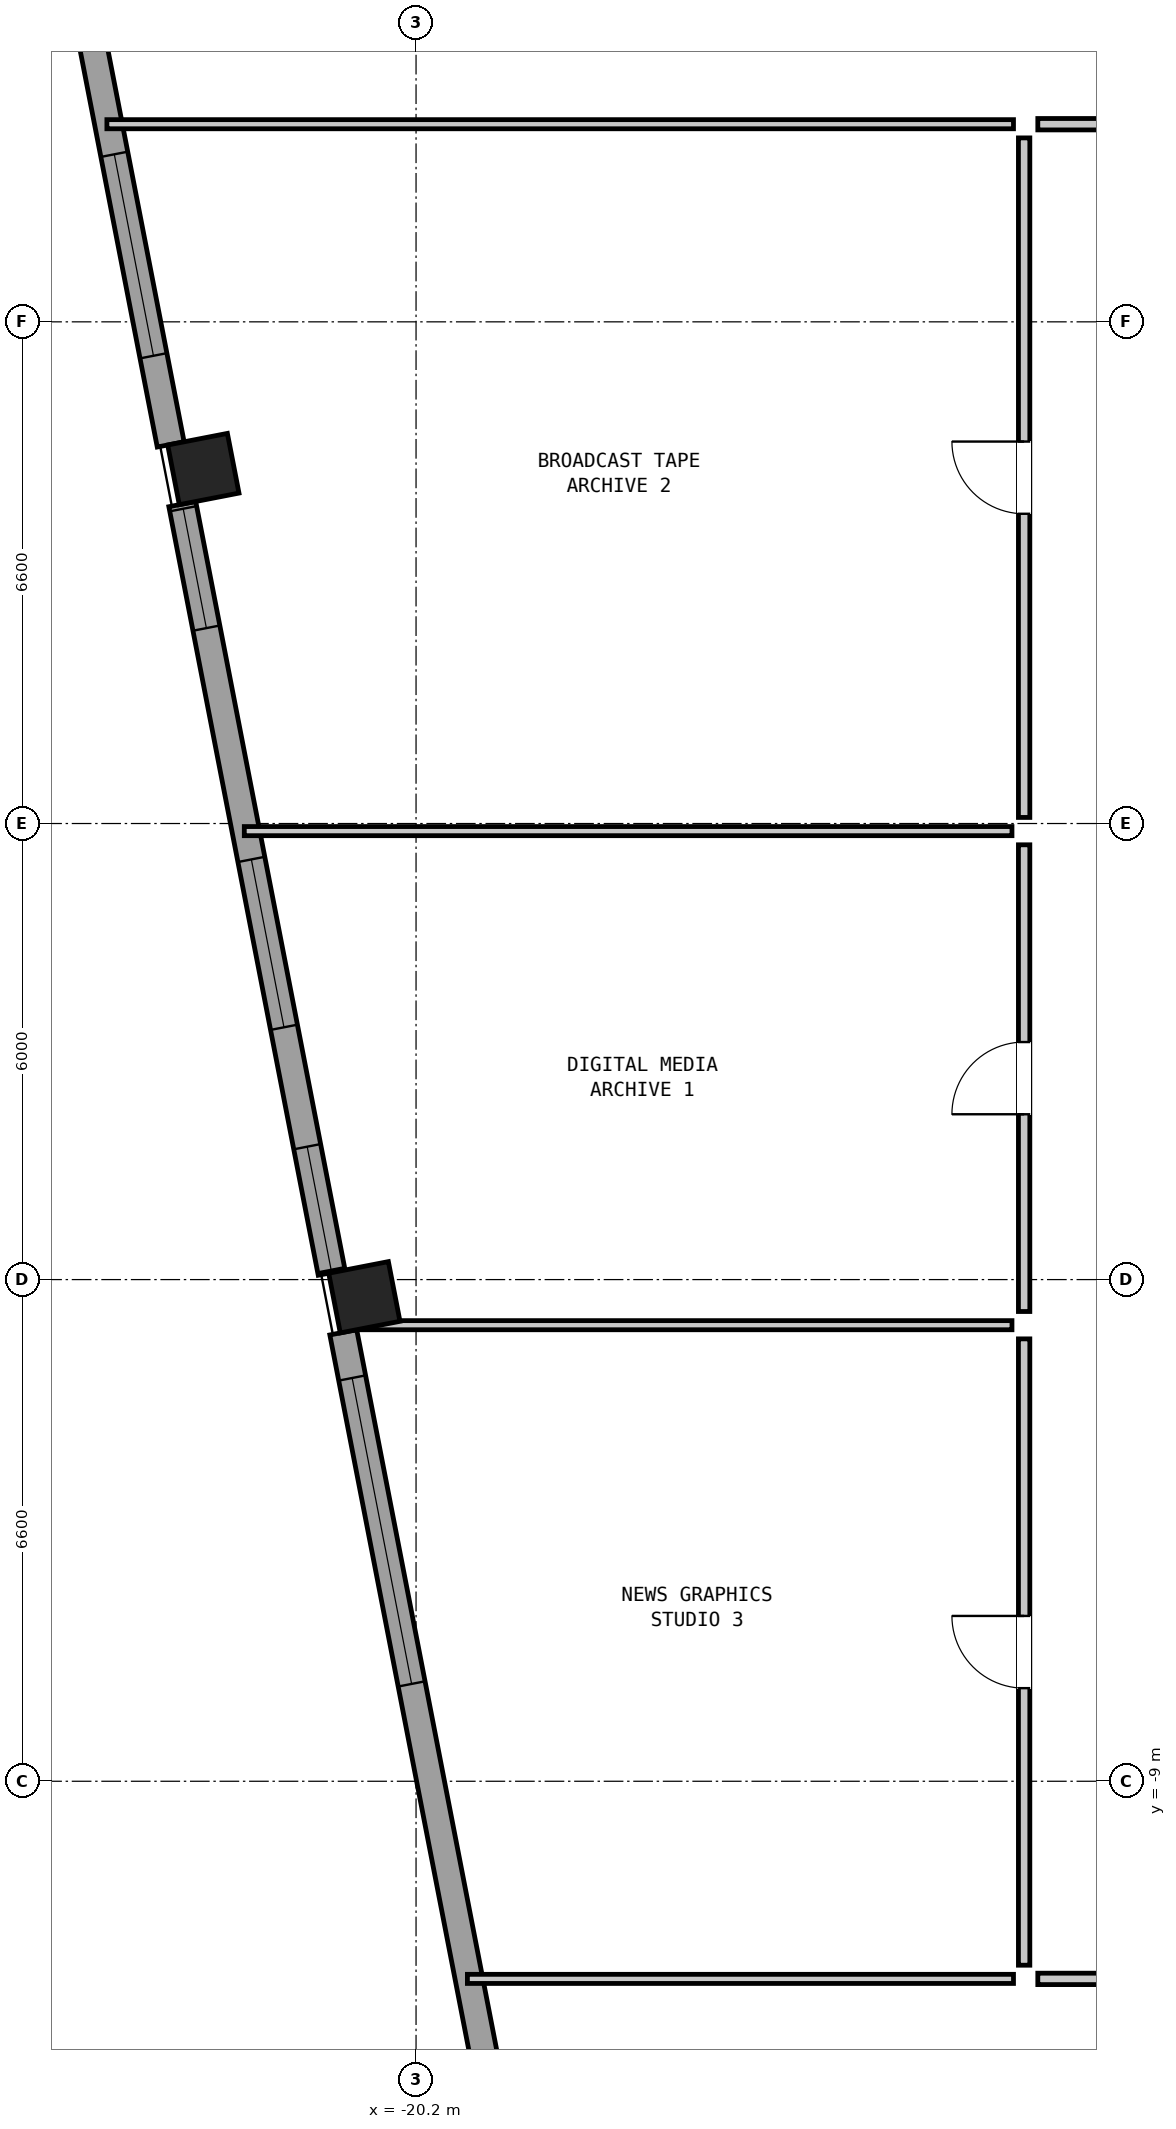
"""IFC4 building model, lengths in metres.
Left out: names, types, materials, properties, quantities, classifications, styles, units other than length and angle.
Written with IfcOpenShell. Run it as: python <this file> out.ifc"""

import sys

from ifc_helpers import new_model, si_unit, direction, frame, frame_2d, origin, origin_2d, place, context, subcontext, project, spatial, rectangle, hollow_rectangle, extrude, element, fill, save


model = new_model("IFC4")
c1 = context("Model", 3, precision=1e-05, world=origin(), true_north=direction((0.0, 1.0)))
c2 = subcontext(c1, "Body", "Model", "MODEL_VIEW")
j1 = project(units=[si_unit("LENGTHUNIT", "METRE"), si_unit("PLANEANGLEUNIT", "RADIAN")], contexts=[c1])
p1 = place(None, origin())
s1 = spatial("IfcSite", under=j1, at=p1, CompositionType="ELEMENT")
p2 = place(p1, origin())
s2 = spatial("IfcBuilding", under=s1, at=p2, CompositionType="ELEMENT")
p3 = place(p2, frame((0.0, 0.0, 131.1)))
s3 = spatial("IfcBuildingStorey", under=s2, at=p3, CompositionType="ELEMENT", Elevation=131.1)
for number, where, z_axis, x_axis in (
    (1, (-22.998, 8.263, 0.0), (0.0, 0.0, 1.0), (-0.191, 0.982, 0.0)),
    (2, (-20.88, -2.633, 0.0), (0.0, 0.0, 1.0), (-0.191, 0.982, 0.0)),
):
    element("IfcColumn", number, at=place(p3, frame(where, z_axis=z_axis, x_axis=x_axis)), inside=s3, PredefinedType="COLUMN", context=c2, shape_type="SweptSolid", body=[
        extrude(hollow_rectangle(XDim=0.8, YDim=0.8, WallThickness=0.05, at=origin_2d()), origin(), (0.0, 0.0, 1.0), 3.05),
    ])
p4 = place(p3, frame((-19.19, -13.217, 0.0), z_axis=(0.0, 0.0, 1.0), x_axis=(-0.190822765986, 0.981624506612, 0.0)))
e3 = element("IfcWall", 3, at=p4, inside=s3, PredefinedType="SOLIDWALL", context=c2, shape_type="SweptSolid", body=[
    extrude(rectangle(XDim=10.312, YDim=0.36, at=frame_2d((5.156, 0.0))), origin(), (0.0, 0.0, 1.0), 2.067),
])
p5 = place(p4, frame((5.6, 0.0, 0.2)))
e4 = element("IfcOpeningElement", 4, at=p5, cuts=e3, PredefinedType="OPENING", context=c2, shape_type="SweptSolid", body=[
    extrude(rectangle(XDim=4.1, YDim=1.05, at=frame_2d((2.05, 0.525))), frame((0.0, 0.192, 0.0), z_axis=(0.0, -1.0, 0.0), x_axis=(1.0, 0.0, 0.0)), (0.0, 0.0, 1.0), 0.384),
])
p6 = place(p3, frame((-21.31, -2.309, 0.0), z_axis=(0.0, 0.0, 1.0), x_axis=(-0.190811924826, 0.981626614016, 0.0)))
e5 = element("IfcWall", 5, at=p6, inside=s3, PredefinedType="SOLIDWALL", context=c2, shape_type="SweptSolid", body=[
    extrude(rectangle(XDim=10.3, YDim=0.36, at=frame_2d((5.15, 0.0))), origin(), (0.0, 0.0, 1.0), 2.067),
])
p7 = place(p6, frame((0.038, 0.0, 1.15)))
e6 = element("IfcOpeningElement", 6, at=p7, cuts=e5, PredefinedType="OPENING", context=c2, shape_type="SweptSolid", body=[
    extrude(rectangle(XDim=1.65, YDim=0.75, at=frame_2d((0.825, 0.375))), frame((0.0, 0.192, 0.0), z_axis=(0.0, -1.0, 0.0), x_axis=(1.0, 0.0, 0.0)), (0.0, 0.0, 1.0), 0.384),
])
p8 = place(p6, frame((3.288, 0.0, 0.2)))
e7 = element("IfcOpeningElement", 7, at=p8, cuts=e5, PredefinedType="OPENING", context=c2, shape_type="SweptSolid", body=[
    extrude(rectangle(XDim=2.25, YDim=1.15, at=frame_2d((1.125, 0.575))), frame((0.0, 0.192, 0.0), z_axis=(0.0, -1.0, 0.0), x_axis=(1.0, 0.0, 0.0)), (0.0, 0.0, 1.0), 0.384),
])
p9 = place(p6, frame((8.638, 0.0, 1.15)))
e8 = element("IfcOpeningElement", 8, at=p9, cuts=e5, PredefinedType="OPENING", context=c2, shape_type="SweptSolid", body=[
    extrude(rectangle(XDim=1.6, YDim=0.75, at=frame_2d((0.8, 0.375))), frame((0.0, 0.192, 0.0), z_axis=(0.0, -1.0, 0.0), x_axis=(1.0, 0.0, 0.0)), (0.0, 0.0, 1.0), 0.384),
])
p10 = place(p3, frame((-23.428, 8.587, 0.0), z_axis=(0.0, 0.0, 1.0), x_axis=(-0.190822765986, 0.981624506612, 0.0)))
e9 = element("IfcWall", 9, at=p10, inside=s3, PredefinedType="SOLIDWALL", context=c2, shape_type="SweptSolid", body=[
    extrude(rectangle(XDim=10.312, YDim=0.36, at=frame_2d((5.156, 0.0))), origin(), (0.0, 0.0, 1.0), 2.067),
])
p11 = place(p10, frame((1.188, 0.0, 0.2)))
e10 = element("IfcOpeningElement", 10, at=p11, cuts=e9, PredefinedType="OPENING", context=c2, shape_type="SweptSolid", body=[
    extrude(rectangle(XDim=2.7, YDim=1.35, at=frame_2d((1.35, 0.675))), frame((0.0, 0.192, 0.0), z_axis=(0.0, -1.0, 0.0), x_axis=(1.0, 0.0, 0.0)), (0.0, 0.0, 1.0), 0.384),
])
p12 = place(p10, frame((6.038, 0.0, 1.2)))
e11 = element("IfcOpeningElement", 11, at=p12, cuts=e9, PredefinedType="OPENING", context=c2, shape_type="SweptSolid", body=[
    extrude(rectangle(XDim=1.9, YDim=0.7, at=frame_2d((0.95, 0.35))), frame((0.0, 0.192, 0.0), z_axis=(0.0, -1.0, 0.0), x_axis=(1.0, 0.0, 0.0)), (0.0, 0.0, 1.0), 0.384),
])
p13 = place(p3, frame((-24.267, 12.8, 0.0), z_axis=(0.0, 0.0, 1.0), x_axis=(1.0, 0.0, 0.0)))
e12 = element("IfcWall", 12, at=p13, inside=s3, PredefinedType="PARTITIONING", context=c2, shape_type="SweptSolid", body=[
    extrude(rectangle(XDim=11.927, YDim=0.12, at=frame_2d((5.964, 0.0))), origin(), (0.0, 0.0, 1.0), 2.83),
])
p14 = place(p3, frame((-19.524, -11.6, 0.0), z_axis=(0.0, 0.0, 1.0), x_axis=(1.0, 0.0, 0.0)))
e13 = element("IfcWall", 13, at=p14, inside=s3, PredefinedType="PARTITIONING", context=c2, shape_type="SweptSolid", body=[
    extrude(rectangle(XDim=7.184, YDim=0.12, at=frame_2d((3.592, 0.0))), origin(), (0.0, 0.0, 1.0), 2.347),
])
p15 = place(p3, frame((-21.196, -3.0, 0.0), z_axis=(0.0, 0.0, 1.0), x_axis=(1.0, 0.0, 0.0)))
e14 = element("IfcWall", 14, at=p15, inside=s3, PredefinedType="PARTITIONING", context=c2, shape_type="SweptSolid", body=[
    extrude(rectangle(XDim=8.836, YDim=0.12, at=frame_2d((4.418, 0.0))), origin(), (0.0, 0.0, 1.0), 1.883),
])
p16 = place(p3, frame((-22.459, 3.5, 0.0), z_axis=(0.0, 0.0, 1.0), x_axis=(1.0, 0.0, 0.0)))
e15 = element("IfcWall", 15, at=p16, inside=s3, PredefinedType="PARTITIONING", context=c2, shape_type="SweptSolid", body=[
    extrude(rectangle(XDim=10.099, YDim=0.12, at=frame_2d((5.05, 0.0))), origin(), (0.0, 0.0, 1.0), 1.883),
])
p17 = place(p3, frame((-12.02, 12.8, 0.0), z_axis=(0.0, 0.0, 1.0), x_axis=(1.0, 0.0, 0.0)))
e16 = element("IfcWall", 16, at=p17, inside=s3, PredefinedType="PARTITIONING", context=c2, shape_type="SweptSolid", body=[
    extrude(rectangle(XDim=5.34, YDim=0.15, at=frame_2d((2.67, 0.0))), origin(), (0.0, 0.0, 1.0), 2.83),
])
p18 = place(p17, frame((2.995, 0.0, 0.0)))
e17 = element("IfcOpeningElement", 17, at=p18, cuts=e16, PredefinedType="OPENING", context=c2, shape_type="SweptSolid", body=[
    extrude(rectangle(XDim=0.95, YDim=2.1, at=frame_2d((0.475, 1.05))), frame((0.0, 0.087, 0.0), z_axis=(0.0, -1.0, 0.0), x_axis=(1.0, 0.0, 0.0)), (0.0, 0.0, 1.0), 0.174),
])
p19 = place(p3, frame((-12.02, -11.6, 0.0), z_axis=(0.0, 0.0, 1.0), x_axis=(1.0, 0.0, 0.0)))
e18 = element("IfcWall", 18, at=p19, inside=s3, PredefinedType="PARTITIONING", context=c2, shape_type="SweptSolid", body=[
    extrude(rectangle(XDim=5.84, YDim=0.15, at=frame_2d((2.92, 0.0))), origin(), (0.0, 0.0, 1.0), 2.347),
])
p20 = place(p19, frame((3.045, 0.0, 0.0)))
e19 = element("IfcOpeningElement", 19, at=p20, cuts=e18, PredefinedType="OPENING", context=c2, shape_type="SweptSolid", body=[
    extrude(rectangle(XDim=0.95, YDim=2.1, at=frame_2d((0.475, 1.05))), frame((0.0, 0.087, 0.0), z_axis=(0.0, -1.0, 0.0), x_axis=(1.0, 0.0, 0.0)), (0.0, 0.0, 1.0), 0.174),
])
p21 = place(p3, frame((-12.2, -11.42, 0.0), z_axis=(0.0, 0.0, 1.0), x_axis=(0.0, 1.0, 0.0)))
e20 = element("IfcWall", 20, at=p21, inside=s3, PredefinedType="PARTITIONING", context=c2, shape_type="SweptSolid", body=[
    extrude(rectangle(XDim=8.24, YDim=0.15, at=frame_2d((4.12, 0.0))), origin(), (0.0, 0.0, 1.0), 2.83),
])
p22 = place(p21, frame((3.645, 0.0, 0.0)))
e21 = element("IfcOpeningElement", 21, at=p22, cuts=e20, PredefinedType="OPENING", context=c2, shape_type="SweptSolid", body=[
    extrude(rectangle(XDim=0.95, YDim=2.1, at=frame_2d((0.475, 1.05))), frame((0.0, 0.087, 0.0), z_axis=(0.0, -1.0, 0.0), x_axis=(1.0, 0.0, 0.0)), (0.0, 0.0, 1.0), 0.174),
])
p23 = place(p3, frame((-12.2, -2.82, 0.0), z_axis=(0.0, 0.0, 1.0), x_axis=(0.0, 1.0, 0.0)))
e22 = element("IfcWall", 22, at=p23, inside=s3, PredefinedType="PARTITIONING", context=c2, shape_type="SweptSolid", body=[
    extrude(rectangle(XDim=6.14, YDim=0.15, at=frame_2d((3.07, 0.0))), origin(), (0.0, 0.0, 1.0), 2.83),
])
p24 = place(p23, frame((2.595, 0.0, 0.0)))
e23 = element("IfcOpeningElement", 23, at=p24, cuts=e22, PredefinedType="OPENING", context=c2, shape_type="SweptSolid", body=[
    extrude(rectangle(XDim=0.95, YDim=2.1, at=frame_2d((0.475, 1.05))), frame((0.0, 0.087, 0.0), z_axis=(0.0, -1.0, 0.0), x_axis=(1.0, 0.0, 0.0)), (0.0, 0.0, 1.0), 0.174),
])
p25 = place(p3, frame((-12.2, 3.68, 0.0), z_axis=(0.0, 0.0, 1.0), x_axis=(0.0, 1.0, 0.0)))
e24 = element("IfcWall", 24, at=p25, inside=s3, PredefinedType="PARTITIONING", context=c2, shape_type="SweptSolid", body=[
    extrude(rectangle(XDim=8.94, YDim=0.15, at=frame_2d((4.47, 0.0))), origin(), (0.0, 0.0, 1.0), 2.83),
])
p26 = place(p25, frame((3.995, 0.0, 0.0)))
e25 = element("IfcOpeningElement", 25, at=p26, cuts=e24, PredefinedType="OPENING", context=c2, shape_type="SweptSolid", body=[
    extrude(rectangle(XDim=0.95, YDim=2.1, at=frame_2d((0.475, 1.05))), frame((0.0, 0.087, 0.0), z_axis=(0.0, -1.0, 0.0), x_axis=(1.0, 0.0, 0.0)), (0.0, 0.0, 1.0), 0.174),
])
p27 = place(p5, origin())
e26 = element("IfcWindow", 26, at=p27, inside=s3, PartitioningType="SINGLE_PANEL", PredefinedType="WINDOW", context=c2, shape_type="SweptSolid", body=[
    extrude(rectangle(XDim=4.1, YDim=1.05, at=frame_2d((2.05, 0.525))), frame((0.0, 0.03, 0.0), z_axis=(0.0, -1.0, 0.0), x_axis=(1.0, 0.0, 0.0)), (0.0, 0.0, 1.0), 0.06),
])
fill(e4, e26)
p28 = place(p7, origin())
e27 = element("IfcWindow", 27, at=p28, inside=s3, PartitioningType="SINGLE_PANEL", PredefinedType="WINDOW", context=c2, shape_type="SweptSolid", body=[
    extrude(rectangle(XDim=1.65, YDim=0.75, at=frame_2d((0.825, 0.375))), frame((0.0, 0.03, 0.0), z_axis=(0.0, -1.0, 0.0), x_axis=(1.0, 0.0, 0.0)), (0.0, 0.0, 1.0), 0.06),
])
fill(e6, e27)
p29 = place(p8, origin())
e28 = element("IfcWindow", 28, at=p29, inside=s3, PartitioningType="SINGLE_PANEL", PredefinedType="WINDOW", context=c2, shape_type="SweptSolid", body=[
    extrude(rectangle(XDim=2.25, YDim=1.15, at=frame_2d((1.125, 0.575))), frame((0.0, 0.03, 0.0), z_axis=(0.0, -1.0, 0.0), x_axis=(1.0, 0.0, 0.0)), (0.0, 0.0, 1.0), 0.06),
])
fill(e7, e28)
p30 = place(p9, origin())
e29 = element("IfcWindow", 29, at=p30, inside=s3, PartitioningType="SINGLE_PANEL", PredefinedType="WINDOW", context=c2, shape_type="SweptSolid", body=[
    extrude(rectangle(XDim=1.6, YDim=0.75, at=frame_2d((0.8, 0.375))), frame((0.0, 0.03, 0.0), z_axis=(0.0, -1.0, 0.0), x_axis=(1.0, 0.0, 0.0)), (0.0, 0.0, 1.0), 0.06),
])
fill(e8, e29)
p31 = place(p11, origin())
e30 = element("IfcWindow", 30, at=p31, inside=s3, PartitioningType="SINGLE_PANEL", PredefinedType="WINDOW", context=c2, shape_type="SweptSolid", body=[
    extrude(rectangle(XDim=2.7, YDim=1.35, at=frame_2d((1.35, 0.675))), frame((0.0, 0.03, 0.0), z_axis=(0.0, -1.0, 0.0), x_axis=(1.0, 0.0, 0.0)), (0.0, 0.0, 1.0), 0.06),
])
fill(e10, e30)
p32 = place(p22, origin())
e31 = element("IfcDoor", 31, at=p32, inside=s3, OperationType="SINGLE_SWING_RIGHT", PredefinedType="DOOR", context=c2, shape_type="SweptSolid", body=[
    extrude(rectangle(XDim=0.95, YDim=2.1, at=frame_2d((0.475, 1.05))), frame((0.0, 0.025, 0.0), z_axis=(0.0, -1.0, 0.0), x_axis=(1.0, 0.0, 0.0)), (0.0, 0.0, 1.0), 0.05),
])
fill(e21, e31)
p33 = place(p24, origin())
e32 = element("IfcDoor", 32, at=p33, inside=s3, OperationType="SINGLE_SWING_LEFT", PredefinedType="DOOR", context=c2, shape_type="SweptSolid", body=[
    extrude(rectangle(XDim=0.95, YDim=2.1, at=frame_2d((0.475, 1.05))), frame((0.0, 0.025, 0.0), z_axis=(0.0, -1.0, 0.0), x_axis=(1.0, 0.0, 0.0)), (0.0, 0.0, 1.0), 0.05),
])
fill(e23, e32)
p34 = place(p26, origin())
e33 = element("IfcDoor", 33, at=p34, inside=s3, OperationType="SINGLE_SWING_RIGHT", PredefinedType="DOOR", context=c2, shape_type="SweptSolid", body=[
    extrude(rectangle(XDim=0.95, YDim=2.1, at=frame_2d((0.475, 1.05))), frame((0.0, 0.025, 0.0), z_axis=(0.0, -1.0, 0.0), x_axis=(1.0, 0.0, 0.0)), (0.0, 0.0, 1.0), 0.05),
])
fill(e25, e33)
save(model, sys.argv[1])
